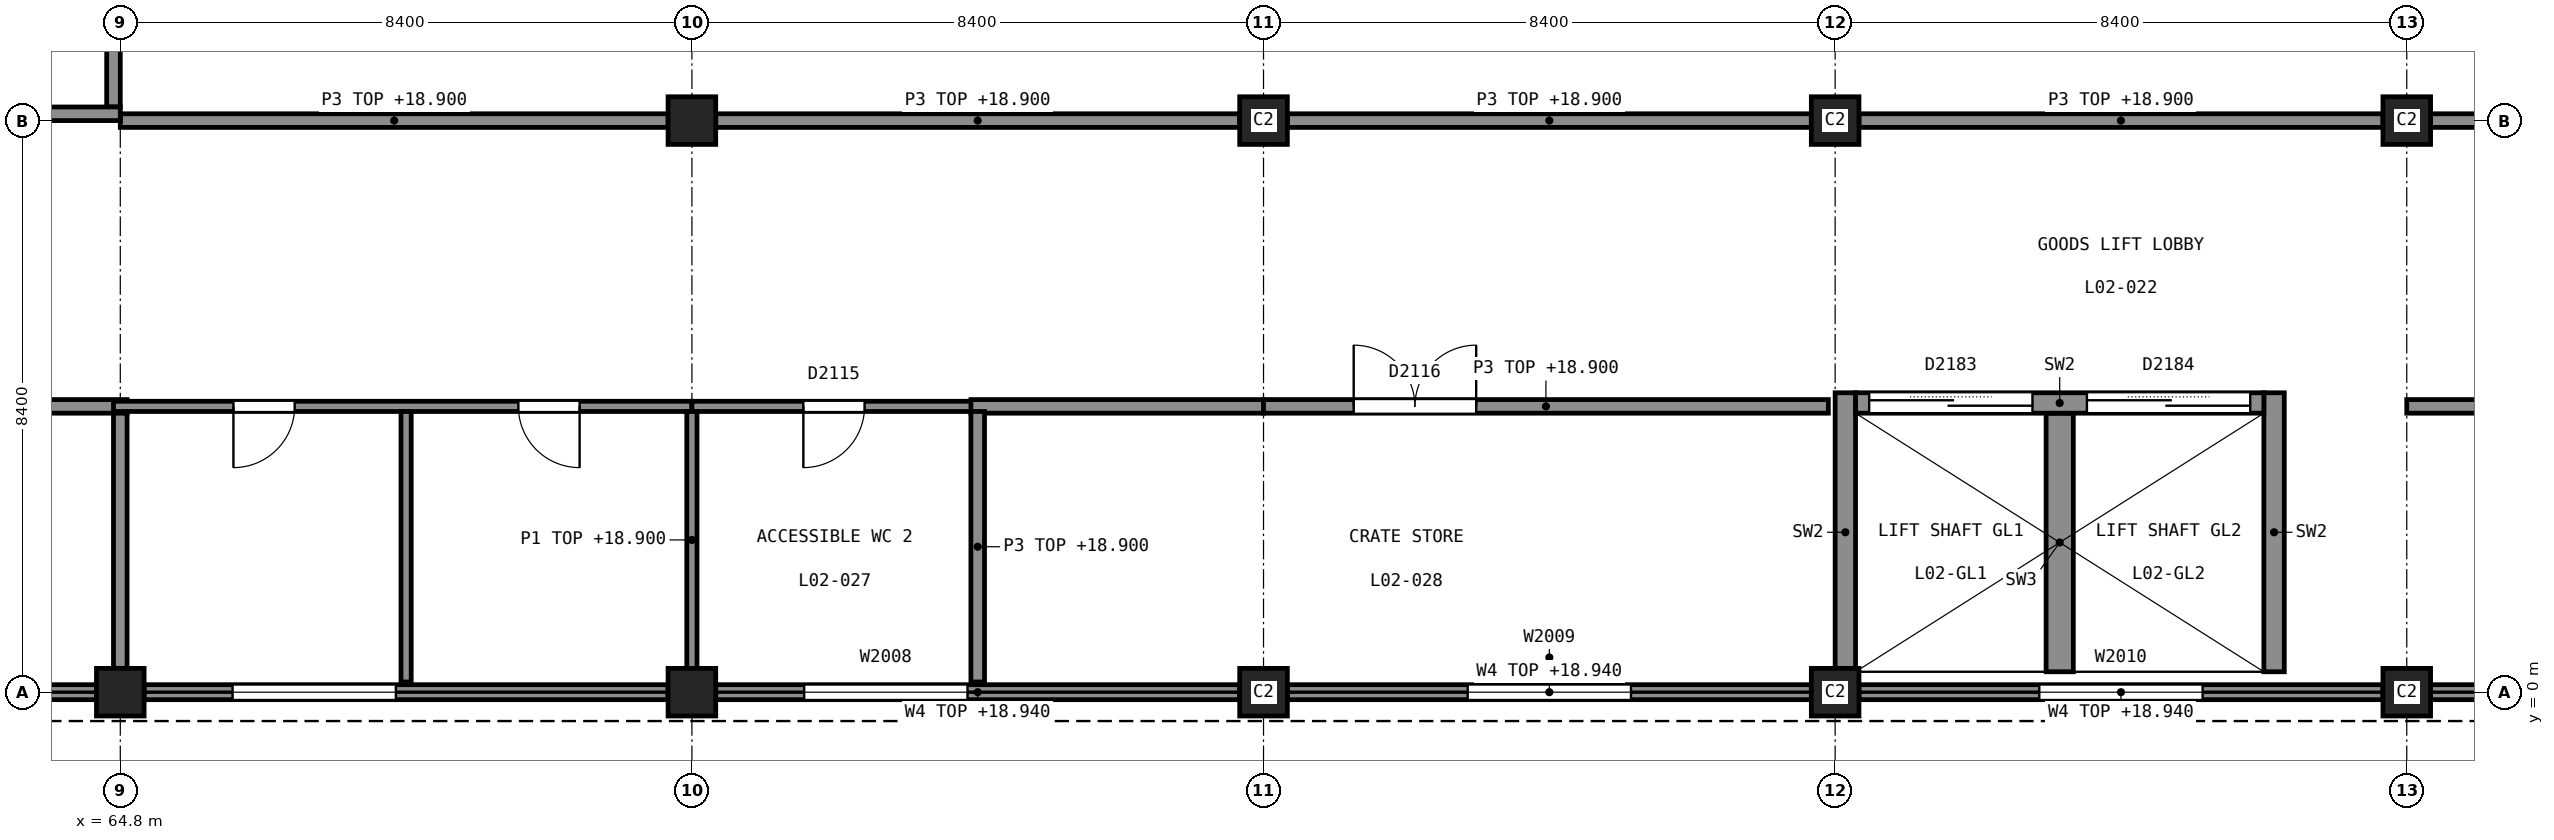
"""IFC4 building model, lengths in metres.
Left out: names, types, materials, properties, quantities, classifications, styles, units other than length and angle.
Written with IfcOpenShell. Run it as: python <this file> out.ifc"""

import sys

from ifc_helpers import new_model, si_unit, direction, frame, frame_2d, origin, origin_2d, place, context, subcontext, project, spatial, rectangle, extrude, element, fill, save


model = new_model("IFC4")
c1 = context("Model", 3, precision=1e-05, world=origin(), true_north=direction((0.0, 1.0)))
c2 = subcontext(c1, "Body", "Model", "MODEL_VIEW")
j1 = project(units=[si_unit("LENGTHUNIT", "METRE"), si_unit("PLANEANGLEUNIT", "RADIAN")], contexts=[c1])
p1 = place(None, origin())
s1 = spatial("IfcSite", under=j1, at=p1, CompositionType="ELEMENT")
p2 = place(p1, origin())
s2 = spatial("IfcBuilding", under=s1, at=p2, CompositionType="ELEMENT")
p3 = place(p2, frame((0.0, 0.0, 10.5)))
s3 = spatial("IfcBuildingStorey", under=s2, at=p3, CompositionType="ELEMENT", Elevation=10.5)
p4 = place(p3, frame((56.4, 8.5, 0.0), z_axis=(0.0, 0.0, 1.0), x_axis=(1.0, 0.0, 0.0)))
e1 = element("IfcWall", 1, at=p4, inside=s3, PredefinedType="SHEAR", context=c2, shape_type="SweptSolid", body=[
    extrude(rectangle(XDim=8.4, YDim=0.2, at=frame_2d((4.2, 0.0))), origin(), (0.0, 0.0, 1.0), 9.5),
])
p5 = place(p4, frame((3.3, 0.0, 0.0)))
e2 = element("IfcOpeningElement", 2, at=p5, cuts=e1, PredefinedType="OPENING", context=c2, shape_type="SweptSolid", body=[
    extrude(rectangle(XDim=1.8, YDim=2.1, at=frame_2d((0.9, 1.05))), frame((0.0, 0.11, 0.0), z_axis=(0.0, -1.0, 0.0), x_axis=(1.0, 0.0, 0.0)), (0.0, 0.0, 1.0), 0.22),
])
p6 = place(p3, frame((64.7, 8.6, 0.0), z_axis=(0.0, 0.0, 1.0), x_axis=(0.0, 1.0, 0.0)))
e3 = element("IfcWall", 3, at=p6, inside=s3, PredefinedType="SHEAR", context=c2, shape_type="SweptSolid", body=[
    extrude(rectangle(XDim=8.0, YDim=0.2, at=frame_2d((4.0, 0.0))), origin(), (0.0, 0.0, 1.0), 9.5),
])
for number, where, z_axis, x_axis in (
    (4, (90.15, 0.3, 0.0), (0.0, 0.0, 1.0), (0.0, 1.0, 0.0)),
    (5, (96.45, 0.3, 0.0), (0.0, 0.0, 1.0), (0.0, 1.0, 0.0)),
):
    element("IfcWall", number, at=place(p3, frame(where, z_axis=z_axis, x_axis=x_axis)), inside=s3, PredefinedType="SHEAR", context=c2, shape_type="SweptSolid", body=[
        extrude(rectangle(XDim=4.1, YDim=0.3, at=frame_2d((2.05, 0.0))), origin(), (0.0, 0.0, 1.0), 9.5),
    ])
p7 = place(p3, frame((90.3, 4.25, 0.0), z_axis=(0.0, 0.0, 1.0), x_axis=(1.0, 0.0, 0.0)))
e6 = element("IfcWall", 6, at=p7, inside=s3, PredefinedType="SHEAR", context=c2, shape_type="SweptSolid", body=[
    extrude(rectangle(XDim=6.0, YDim=0.3, at=frame_2d((3.0, 0.0))), origin(), (0.0, 0.0, 1.0), 9.5),
])
p8 = place(p7, frame((0.2, 0.0, 0.0)))
e7 = element("IfcOpeningElement", 7, at=p8, cuts=e6, PredefinedType="OPENING", context=c2, shape_type="SweptSolid", body=[
    extrude(rectangle(XDim=2.4, YDim=2.4, at=frame_2d((1.2, 1.2))), frame((0.0, 0.16, 0.0), z_axis=(0.0, -1.0, 0.0), x_axis=(1.0, 0.0, 0.0)), (0.0, 0.0, 1.0), 0.32),
])
p9 = place(p7, frame((3.4, 0.0, 0.0)))
e8 = element("IfcOpeningElement", 8, at=p9, cuts=e6, PredefinedType="OPENING", context=c2, shape_type="SweptSolid", body=[
    extrude(rectangle(XDim=2.4, YDim=2.4, at=frame_2d((1.2, 1.2))), frame((0.0, 0.16, 0.0), z_axis=(0.0, -1.0, 0.0), x_axis=(1.0, 0.0, 0.0)), (0.0, 0.0, 1.0), 0.32),
])
p10 = place(p3, frame((93.3, 0.3, 0.0), z_axis=(0.0, 0.0, 1.0), x_axis=(0.0, 1.0, 0.0)))
e9 = element("IfcWall", 9, at=p10, inside=s3, PredefinedType="SHEAR", context=c2, shape_type="SweptSolid", body=[
    extrude(rectangle(XDim=3.8, YDim=0.4, at=frame_2d((1.9, 0.0))), origin(), (0.0, 0.0, 1.0), 9.5),
])
for number, where, z_axis, x_axis in (
    (10, (64.8, 0.0, 0.0), (0.0, 0.0, 1.0), (1.0, 0.0, 0.0)),
    (11, (73.2, 0.0, 0.0), (0.0, 0.0, 1.0), (1.0, 0.0, 0.0)),
    (12, (73.2, 8.4, 0.0), (0.0, 0.0, 1.0), (1.0, 0.0, 0.0)),
    (13, (81.6, 0.0, 0.0), (0.0, 0.0, 1.0), (1.0, 0.0, 0.0)),
    (14, (81.6, 8.4, 0.0), (0.0, 0.0, 1.0), (1.0, 0.0, 0.0)),
    (15, (90.0, 0.0, 0.0), (0.0, 0.0, 1.0), (1.0, 0.0, 0.0)),
    (16, (90.0, 8.4, 0.0), (0.0, 0.0, 1.0), (1.0, 0.0, 0.0)),
    (17, (98.4, 0.0, 0.0), (0.0, 0.0, 1.0), (1.0, 0.0, 0.0)),
    (18, (98.4, 8.4, 0.0), (0.0, 0.0, 1.0), (1.0, 0.0, 0.0)),
):
    element("IfcColumn", number, at=place(p3, frame(where, z_axis=z_axis, x_axis=x_axis)), inside=s3, PredefinedType="COLUMN", context=c2, shape_type="SweptSolid", body=[
        extrude(rectangle(XDim=0.7, YDim=0.7, at=origin_2d()), origin(), (0.0, 0.0, 1.0), 9.5),
    ])
p11 = place(p3, frame((56.75, 0.0, 0.0), z_axis=(0.0, 0.0, 1.0), x_axis=(1.0, 0.0, 0.0)))
e19 = element("IfcWall", 19, at=p11, inside=s3, PredefinedType="SOLIDWALL", context=c2, shape_type="SweptSolid", body=[
    extrude(rectangle(XDim=7.7, YDim=0.22, at=frame_2d((3.85, 0.0))), origin(), (0.0, 0.0, 1.0), 8.44),
])
p12 = place(p11, frame((2.65, 0.0, 5.0)))
e20 = element("IfcOpeningElement", 20, at=p12, cuts=e19, PredefinedType="OPENING", context=c2, shape_type="SweptSolid", body=[
    extrude(rectangle(XDim=2.4, YDim=1.5, at=frame_2d((1.2, 0.75))), frame((0.0, 0.12, 0.0), z_axis=(0.0, -1.0, 0.0), x_axis=(1.0, 0.0, 0.0)), (0.0, 0.0, 1.0), 0.24),
])
p13 = place(p3, frame((65.15, 0.0, 0.0), z_axis=(0.0, 0.0, 1.0), x_axis=(1.0, 0.0, 0.0)))
e21 = element("IfcWall", 21, at=p13, inside=s3, PredefinedType="SOLIDWALL", context=c2, shape_type="SweptSolid", body=[
    extrude(rectangle(XDim=7.7, YDim=0.22, at=frame_2d((3.85, 0.0))), origin(), (0.0, 0.0, 1.0), 8.44),
])
p14 = place(p13, frame((1.3, 0.0, 5.0)))
e22 = element("IfcOpeningElement", 22, at=p14, cuts=e21, PredefinedType="OPENING", context=c2, shape_type="SweptSolid", body=[
    extrude(rectangle(XDim=2.4, YDim=1.5, at=frame_2d((1.2, 0.75))), frame((0.0, 0.12, 0.0), z_axis=(0.0, -1.0, 0.0), x_axis=(1.0, 0.0, 0.0)), (0.0, 0.0, 1.0), 0.24),
])
p15 = place(p3, frame((73.55, 0.0, 0.0), z_axis=(0.0, 0.0, 1.0), x_axis=(1.0, 0.0, 0.0)))
e23 = element("IfcWall", 23, at=p15, inside=s3, PredefinedType="SOLIDWALL", context=c2, shape_type="SweptSolid", body=[
    extrude(rectangle(XDim=7.7, YDim=0.22, at=frame_2d((3.85, 0.0))), origin(), (0.0, 0.0, 1.0), 8.44),
])
p16 = place(p15, frame((1.3, 0.0, 5.0)))
e24 = element("IfcOpeningElement", 24, at=p16, cuts=e23, PredefinedType="OPENING", context=c2, shape_type="SweptSolid", body=[
    extrude(rectangle(XDim=2.4, YDim=1.5, at=frame_2d((1.2, 0.75))), frame((0.0, 0.12, 0.0), z_axis=(0.0, -1.0, 0.0), x_axis=(1.0, 0.0, 0.0)), (0.0, 0.0, 1.0), 0.24),
])
p17 = place(p3, frame((81.95, 0.0, 0.0), z_axis=(0.0, 0.0, 1.0), x_axis=(1.0, 0.0, 0.0)))
e25 = element("IfcWall", 25, at=p17, inside=s3, PredefinedType="SOLIDWALL", context=c2, shape_type="SweptSolid", body=[
    extrude(rectangle(XDim=7.7, YDim=0.22, at=frame_2d((3.85, 0.0))), origin(), (0.0, 0.0, 1.0), 8.44),
])
p18 = place(p17, frame((2.65, 0.0, 5.0)))
e26 = element("IfcOpeningElement", 26, at=p18, cuts=e25, PredefinedType="OPENING", context=c2, shape_type="SweptSolid", body=[
    extrude(rectangle(XDim=2.4, YDim=1.5, at=frame_2d((1.2, 0.75))), frame((0.0, 0.12, 0.0), z_axis=(0.0, -1.0, 0.0), x_axis=(1.0, 0.0, 0.0)), (0.0, 0.0, 1.0), 0.24),
])
p19 = place(p3, frame((90.35, 0.0, 0.0), z_axis=(0.0, 0.0, 1.0), x_axis=(1.0, 0.0, 0.0)))
e27 = element("IfcWall", 27, at=p19, inside=s3, PredefinedType="SOLIDWALL", context=c2, shape_type="SweptSolid", body=[
    extrude(rectangle(XDim=7.7, YDim=0.22, at=frame_2d((3.85, 0.0))), origin(), (0.0, 0.0, 1.0), 8.44),
])
p20 = place(p19, frame((2.65, 0.0, 5.0)))
e28 = element("IfcOpeningElement", 28, at=p20, cuts=e27, PredefinedType="OPENING", context=c2, shape_type="SweptSolid", body=[
    extrude(rectangle(XDim=2.4, YDim=1.5, at=frame_2d((1.2, 0.75))), frame((0.0, 0.12, 0.0), z_axis=(0.0, -1.0, 0.0), x_axis=(1.0, 0.0, 0.0)), (0.0, 0.0, 1.0), 0.24),
])
p21 = place(p3, frame((98.75, 0.0, 0.0), z_axis=(0.0, 0.0, 1.0), x_axis=(1.0, 0.0, 0.0)))
e29 = element("IfcWall", 29, at=p21, inside=s3, PredefinedType="SOLIDWALL", context=c2, shape_type="SweptSolid", body=[
    extrude(rectangle(XDim=7.7, YDim=0.22, at=frame_2d((3.85, 0.0))), origin(), (0.0, 0.0, 1.0), 8.44),
])
p22 = place(p21, frame((2.65, 0.0, 5.0)))
e30 = element("IfcOpeningElement", 30, at=p22, cuts=e29, PredefinedType="OPENING", context=c2, shape_type="SweptSolid", body=[
    extrude(rectangle(XDim=2.4, YDim=1.5, at=frame_2d((1.2, 0.75))), frame((0.0, 0.12, 0.0), z_axis=(0.0, -1.0, 0.0), x_axis=(1.0, 0.0, 0.0)), (0.0, 0.0, 1.0), 0.24),
])
p23 = place(p3, frame((64.8, 8.4, 0.0), z_axis=(0.0, 0.0, 1.0), x_axis=(1.0, 0.0, 0.0)))
e31 = element("IfcWall", 31, at=p23, inside=s3, PredefinedType="PARTITIONING", context=c2, shape_type="SweptSolid", body=[
    extrude(rectangle(XDim=8.05, YDim=0.2, at=frame_2d((4.025, 0.0))), origin(), (0.0, 0.0, 1.0), 8.4),
])
for number, where, z_axis, x_axis in (
    (32, (73.55, 8.4, 0.0), (0.0, 0.0, 1.0), (1.0, 0.0, 0.0)),
    (33, (81.95, 8.4, 0.0), (0.0, 0.0, 1.0), (1.0, 0.0, 0.0)),
    (34, (90.35, 8.4, 0.0), (0.0, 0.0, 1.0), (1.0, 0.0, 0.0)),
    (35, (98.75, 8.4, 0.0), (0.0, 0.0, 1.0), (1.0, 0.0, 0.0)),
):
    element("IfcWall", number, at=place(p3, frame(where, z_axis=z_axis, x_axis=x_axis)), inside=s3, PredefinedType="PARTITIONING", context=c2, shape_type="SweptSolid", body=[
        extrude(rectangle(XDim=7.7, YDim=0.2, at=frame_2d((3.85, 0.0))), origin(), (0.0, 0.0, 1.0), 8.4),
    ])
p24 = place(p3, frame((98.4, 4.2, 0.0), z_axis=(0.0, 0.0, 1.0), x_axis=(1.0, 0.0, 0.0)))
e36 = element("IfcWall", 36, at=p24, inside=s3, PredefinedType="PARTITIONING", context=c2, shape_type="SweptSolid", body=[
    extrude(rectangle(XDim=8.4, YDim=0.2, at=frame_2d((4.2, 0.0))), origin(), (0.0, 0.0, 1.0), 8.4),
])
p25 = place(p24, frame((4.675, 0.0, 0.0)))
e37 = element("IfcOpeningElement", 37, at=p25, cuts=e36, PredefinedType="OPENING", context=c2, shape_type="SweptSolid", body=[
    extrude(rectangle(XDim=3.0, YDim=3.0, at=frame_2d((1.5, 1.5))), frame((0.0, 0.11, 0.0), z_axis=(0.0, -1.0, 0.0), x_axis=(1.0, 0.0, 0.0)), (0.0, 0.0, 1.0), 0.22),
])
p26 = place(p3, frame((56.4, 4.2, 0.0), z_axis=(0.0, 0.0, 1.0), x_axis=(1.0, 0.0, 0.0)))
e38 = element("IfcWall", 38, at=p26, inside=s3, PredefinedType="PARTITIONING", context=c2, shape_type="SweptSolid", body=[
    extrude(rectangle(XDim=8.5, YDim=0.2, at=frame_2d((4.25, 0.0))), origin(), (0.0, 0.0, 1.0), 8.4),
])
p27 = place(p3, frame((64.7, 4.2, 0.0), z_axis=(0.0, 0.0, 1.0), x_axis=(1.0, 0.0, 0.0)))
e39 = element("IfcWall", 39, at=p27, inside=s3, PredefinedType="PARTITIONING", context=c2, shape_type="SweptSolid", body=[
    extrude(rectangle(XDim=8.5, YDim=0.15, at=frame_2d((4.25, 0.0))), origin(), (0.0, 0.0, 1.0), 8.4),
])
p28 = place(p27, frame((1.762, 0.0, 0.0)))
e40 = element("IfcOpeningElement", 40, at=p28, cuts=e39, PredefinedType="OPENING", context=c2, shape_type="SweptSolid", body=[
    extrude(rectangle(XDim=0.9, YDim=2.1, at=frame_2d((0.45, 1.05))), frame((0.0, 0.085, 0.0), z_axis=(0.0, -1.0, 0.0), x_axis=(1.0, 0.0, 0.0)), (0.0, 0.0, 1.0), 0.17),
])
p29 = place(p27, frame((5.95, 0.0, 0.0)))
e41 = element("IfcOpeningElement", 41, at=p29, cuts=e39, PredefinedType="OPENING", context=c2, shape_type="SweptSolid", body=[
    extrude(rectangle(XDim=0.9, YDim=2.1, at=frame_2d((0.45, 1.05))), frame((0.0, 0.085, 0.0), z_axis=(0.0, -1.0, 0.0), x_axis=(1.0, 0.0, 0.0)), (0.0, 0.0, 1.0), 0.17),
])
p30 = place(p3, frame((73.2, 4.2, 0.0), z_axis=(0.0, 0.0, 1.0), x_axis=(1.0, 0.0, 0.0)))
e42 = element("IfcWall", 42, at=p30, inside=s3, PredefinedType="PARTITIONING", context=c2, shape_type="SweptSolid", body=[
    extrude(rectangle(XDim=4.3, YDim=0.15, at=frame_2d((2.15, 0.0))), origin(), (0.0, 0.0, 1.0), 8.4),
])
p31 = place(p30, frame((1.637, 0.0, 0.0)))
e43 = element("IfcOpeningElement", 43, at=p31, cuts=e42, PredefinedType="OPENING", context=c2, shape_type="SweptSolid", body=[
    extrude(rectangle(XDim=0.9, YDim=2.1, at=frame_2d((0.45, 1.05))), frame((0.0, 0.085, 0.0), z_axis=(0.0, -1.0, 0.0), x_axis=(1.0, 0.0, 0.0)), (0.0, 0.0, 1.0), 0.17),
])
p32 = place(p3, frame((77.3, 4.2, 0.0), z_axis=(0.0, 0.0, 1.0), x_axis=(1.0, 0.0, 0.0)))
e44 = element("IfcWall", 44, at=p32, inside=s3, PredefinedType="PARTITIONING", context=c2, shape_type="SweptSolid", body=[
    extrude(rectangle(XDim=4.3, YDim=0.2, at=frame_2d((2.15, 0.0))), origin(), (0.0, 0.0, 1.0), 8.4),
])
p33 = place(p3, frame((81.6, 4.2, 0.0), z_axis=(0.0, 0.0, 1.0), x_axis=(1.0, 0.0, 0.0)))
e45 = element("IfcWall", 45, at=p33, inside=s3, PredefinedType="PARTITIONING", context=c2, shape_type="SweptSolid", body=[
    extrude(rectangle(XDim=8.3, YDim=0.2, at=frame_2d((4.15, 0.0))), origin(), (0.0, 0.0, 1.0), 8.4),
])
p34 = place(p33, frame((1.325, 0.0, 0.0)))
e46 = element("IfcOpeningElement", 46, at=p34, cuts=e45, PredefinedType="OPENING", context=c2, shape_type="SweptSolid", body=[
    extrude(rectangle(XDim=1.8, YDim=2.1, at=frame_2d((0.9, 1.05))), frame((0.0, 0.11, 0.0), z_axis=(0.0, -1.0, 0.0), x_axis=(1.0, 0.0, 0.0)), (0.0, 0.0, 1.0), 0.22),
])
p35 = place(p3, frame((64.8, 0.35, 0.0), z_axis=(0.0, 0.0, 1.0), x_axis=(0.0, 1.0, 0.0)))
e47 = element("IfcWall", 47, at=p35, inside=s3, PredefinedType="PARTITIONING", context=c2, shape_type="SweptSolid", body=[
    extrude(rectangle(XDim=3.75, YDim=0.2, at=frame_2d((1.875, 0.0))), origin(), (0.0, 0.0, 1.0), 8.4),
])
p36 = place(p3, frame((69.0, 0.15, 0.0), z_axis=(0.0, 0.0, 1.0), x_axis=(0.0, 1.0, 0.0)))
e48 = element("IfcWall", 48, at=p36, inside=s3, PredefinedType="PARTITIONING", context=c2, shape_type="SweptSolid", body=[
    extrude(rectangle(XDim=3.975, YDim=0.15, at=frame_2d((1.988, 0.0))), origin(), (0.0, 0.0, 1.0), 8.4),
])
p37 = place(p3, frame((73.2, 0.35, 0.0), z_axis=(0.0, 0.0, 1.0), x_axis=(0.0, 1.0, 0.0)))
e49 = element("IfcWall", 49, at=p37, inside=s3, PredefinedType="PARTITIONING", context=c2, shape_type="SweptSolid", body=[
    extrude(rectangle(XDim=3.775, YDim=0.15, at=frame_2d((1.887, 0.0))), origin(), (0.0, 0.0, 1.0), 8.4),
])
p38 = place(p3, frame((77.4, 0.15, 0.0), z_axis=(0.0, 0.0, 1.0), x_axis=(0.0, 1.0, 0.0)))
e50 = element("IfcWall", 50, at=p38, inside=s3, PredefinedType="PARTITIONING", context=c2, shape_type="SweptSolid", body=[
    extrude(rectangle(XDim=3.975, YDim=0.2, at=frame_2d((1.988, 0.0))), origin(), (0.0, 0.0, 1.0), 8.4),
])
p39 = place(p14, origin())
e51 = element("IfcWindow", 51, at=p39, inside=s3, PartitioningType="SINGLE_PANEL", PredefinedType="WINDOW", context=c2, shape_type="SweptSolid", body=[
    extrude(rectangle(XDim=2.4, YDim=1.5, at=frame_2d((1.2, 0.75))), frame((0.0, 0.09, 0.0), z_axis=(0.0, -1.0, 0.0), x_axis=(1.0, 0.0, 0.0)), (0.0, 0.0, 1.0), 0.06),
])
fill(e22, e51)
p40 = place(p16, origin())
e52 = element("IfcWindow", 52, at=p40, inside=s3, PartitioningType="SINGLE_PANEL", PredefinedType="WINDOW", context=c2, shape_type="SweptSolid", body=[
    extrude(rectangle(XDim=2.4, YDim=1.5, at=frame_2d((1.2, 0.75))), frame((0.0, 0.09, 0.0), z_axis=(0.0, -1.0, 0.0), x_axis=(1.0, 0.0, 0.0)), (0.0, 0.0, 1.0), 0.06),
])
fill(e24, e52)
p41 = place(p18, origin())
e53 = element("IfcWindow", 53, at=p41, inside=s3, PartitioningType="SINGLE_PANEL", PredefinedType="WINDOW", context=c2, shape_type="SweptSolid", body=[
    extrude(rectangle(XDim=2.4, YDim=1.5, at=frame_2d((1.2, 0.75))), frame((0.0, 0.09, 0.0), z_axis=(0.0, -1.0, 0.0), x_axis=(1.0, 0.0, 0.0)), (0.0, 0.0, 1.0), 0.06),
])
fill(e26, e53)
p42 = place(p20, origin())
e54 = element("IfcWindow", 54, at=p42, inside=s3, PartitioningType="SINGLE_PANEL", PredefinedType="WINDOW", context=c2, shape_type="SweptSolid", body=[
    extrude(rectangle(XDim=2.4, YDim=1.5, at=frame_2d((1.2, 0.75))), frame((0.0, 0.09, 0.0), z_axis=(0.0, -1.0, 0.0), x_axis=(1.0, 0.0, 0.0)), (0.0, 0.0, 1.0), 0.06),
])
fill(e28, e54)
p43 = place(p28, origin())
e55 = element("IfcDoor", 55, at=p43, inside=s3, OperationType="SINGLE_SWING_LEFT", PredefinedType="DOOR", context=c2, shape_type="SweptSolid", body=[
    extrude(rectangle(XDim=0.9, YDim=2.1, at=frame_2d((0.45, 1.05))), frame((0.0, 0.025, 0.0), z_axis=(0.0, -1.0, 0.0), x_axis=(1.0, 0.0, 0.0)), (0.0, 0.0, 1.0), 0.05),
])
fill(e40, e55)
p44 = place(p29, origin())
e56 = element("IfcDoor", 56, at=p44, inside=s3, OperationType="SINGLE_SWING_RIGHT", PredefinedType="DOOR", context=c2, shape_type="SweptSolid", body=[
    extrude(rectangle(XDim=0.9, YDim=2.1, at=frame_2d((0.45, 1.05))), frame((0.0, 0.025, 0.0), z_axis=(0.0, -1.0, 0.0), x_axis=(1.0, 0.0, 0.0)), (0.0, 0.0, 1.0), 0.05),
])
fill(e41, e56)
p45 = place(p31, origin())
e57 = element("IfcDoor", 57, at=p45, inside=s3, OperationType="SINGLE_SWING_LEFT", PredefinedType="DOOR", context=c2, shape_type="SweptSolid", body=[
    extrude(rectangle(XDim=0.9, YDim=2.1, at=frame_2d((0.45, 1.05))), frame((0.0, 0.025, 0.0), z_axis=(0.0, -1.0, 0.0), x_axis=(1.0, 0.0, 0.0)), (0.0, 0.0, 1.0), 0.05),
])
fill(e43, e57)
p46 = place(p34, origin())
e58 = element("IfcDoor", 58, at=p46, inside=s3, OperationType="DOUBLE_DOOR_SINGLE_SWING", PredefinedType="DOOR", context=c2, shape_type="SweptSolid", body=[
    extrude(rectangle(XDim=1.8, YDim=2.1, at=frame_2d((0.9, 1.05))), frame((0.0, 0.025, 0.0), z_axis=(0.0, -1.0, 0.0), x_axis=(1.0, 0.0, 0.0)), (0.0, 0.0, 1.0), 0.05),
])
fill(e46, e58)
p47 = place(p8, origin())
e59 = element("IfcDoor", 59, at=p47, inside=s3, OperationType="DOUBLE_DOOR_SLIDING", PredefinedType="DOOR", context=c2, shape_type="SweptSolid", body=[
    extrude(rectangle(XDim=2.4, YDim=2.4, at=frame_2d((1.2, 1.2))), frame((0.0, 0.025, 0.0), z_axis=(0.0, -1.0, 0.0), x_axis=(1.0, 0.0, 0.0)), (0.0, 0.0, 1.0), 0.05),
])
fill(e7, e59)
p48 = place(p9, origin())
e60 = element("IfcDoor", 60, at=p48, inside=s3, OperationType="DOUBLE_DOOR_SLIDING", PredefinedType="DOOR", context=c2, shape_type="SweptSolid", body=[
    extrude(rectangle(XDim=2.4, YDim=2.4, at=frame_2d((1.2, 1.2))), frame((0.0, 0.025, 0.0), z_axis=(0.0, -1.0, 0.0), x_axis=(1.0, 0.0, 0.0)), (0.0, 0.0, 1.0), 0.05),
])
fill(e8, e60)
save(model, sys.argv[1])
